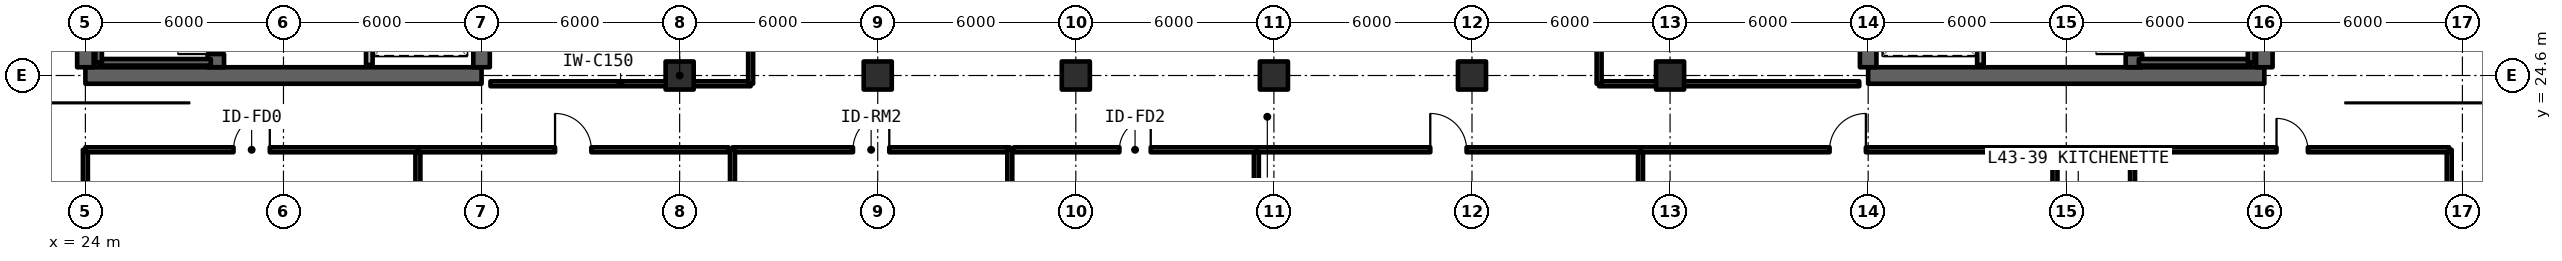
"""IFC4 building model, lengths in metres.
Left out: names, types, materials, properties, quantities, classifications, styles, units other than length and angle.
Written with IfcOpenShell. Run it as: python <this file> out.ifc"""

import sys

from ifc_helpers import new_model, si_unit, direction, frame, frame_2d, origin, origin_2d, place, context, subcontext, project, spatial, rectangle, extrude, element, fill, save


model = new_model("IFC4")
c1 = context("Model", 3, precision=1e-05, world=origin(), true_north=direction((0.0, 1.0)))
c2 = subcontext(c1, "Body", "Model", "MODEL_VIEW")
j1 = project(units=[si_unit("LENGTHUNIT", "METRE"), si_unit("PLANEANGLEUNIT", "RADIAN")], contexts=[c1])
p1 = place(None, origin())
s1 = spatial("IfcSite", under=j1, at=p1, CompositionType="ELEMENT")
p2 = place(p1, origin())
s2 = spatial("IfcBuilding", under=s1, at=p2, CompositionType="ELEMENT")
p3 = place(p2, frame((0.0, 0.0, 155.1)))
s3 = spatial("IfcBuildingStorey", under=s2, at=p3, CompositionType="ELEMENT", Elevation=155.1)
p4 = place(p3, frame((24.0, 24.6, 0.0), z_axis=(0.0, 0.0, 1.0), x_axis=(1.0, 0.0, 0.0)))
e1 = element("IfcWall", 1, at=p4, inside=s3, PredefinedType="SHEAR", context=c2, shape_type="SweptSolid", body=[
    extrude(rectangle(XDim=12.0, YDim=0.5, at=frame_2d((6.0, 0.0))), origin(), (0.0, 0.0, 1.0), 3.3),
])
p5 = place(p3, frame((24.0, 24.85, 0.0), z_axis=(0.0, 0.0, 1.0), x_axis=(0.0, 1.0, 0.0)))
e2 = element("IfcWall", 2, at=p5, inside=s3, PredefinedType="SHEAR", context=c2, shape_type="SweptSolid", body=[
    extrude(rectangle(XDim=17.5, YDim=0.5, at=frame_2d((8.75, 0.0))), origin(), (0.0, 0.0, 1.0), 3.3),
])
p6 = place(p3, frame((36.0, 24.85, 0.0), z_axis=(0.0, 0.0, 1.0), x_axis=(0.0, 1.0, 0.0)))
e3 = element("IfcWall", 3, at=p6, inside=s3, PredefinedType="SHEAR", context=c2, shape_type="SweptSolid", body=[
    extrude(rectangle(XDim=8.95, YDim=0.5, at=frame_2d((4.475, 0.0))), origin(), (0.0, 0.0, 1.0), 3.3),
])
p7 = place(p3, frame((27.95, 24.85, 0.0), z_axis=(0.0, 0.0, 1.0), x_axis=(0.0, 1.0, 0.0)))
e4 = element("IfcWall", 4, at=p7, inside=s3, PredefinedType="SHEAR", context=c2, shape_type="SweptSolid", body=[
    extrude(rectangle(XDim=17.5, YDim=0.5, at=frame_2d((8.75, 0.0))), origin(), (0.0, 0.0, 1.0), 3.3),
])
p8 = place(p7, frame((0.4, 0.0, 0.0)))
e5 = element("IfcOpeningElement", 5, at=p8, cuts=e4, PredefinedType="OPENING", context=c2, shape_type="SweptSolid", body=[
    extrude(rectangle(XDim=1.15, YDim=2.15, at=frame_2d((0.575, 1.075))), frame((0.0, 0.26, 0.0), z_axis=(0.0, -1.0, 0.0), x_axis=(1.0, 0.0, 0.0)), (0.0, 0.0, 1.0), 0.52),
])
p9 = place(p7, frame((9.6, 0.0, 0.0)))
e6 = element("IfcOpeningElement", 6, at=p9, cuts=e4, PredefinedType="OPENING", context=c2, shape_type="SweptSolid", body=[
    extrude(rectangle(XDim=1.15, YDim=2.15, at=frame_2d((0.575, 1.075))), frame((0.0, 0.26, 0.0), z_axis=(0.0, -1.0, 0.0), x_axis=(1.0, 0.0, 0.0)), (0.0, 0.0, 1.0), 0.52),
])
p10 = place(p3, frame((78.0, 24.6, 0.0), z_axis=(0.0, 0.0, 1.0), x_axis=(1.0, 0.0, 0.0)))
e7 = element("IfcWall", 7, at=p10, inside=s3, PredefinedType="SHEAR", context=c2, shape_type="SweptSolid", body=[
    extrude(rectangle(XDim=12.0, YDim=0.5, at=frame_2d((6.0, 0.0))), origin(), (0.0, 0.0, 1.0), 3.3),
])
p11 = place(p3, frame((90.0, 24.85, 0.0), z_axis=(0.0, 0.0, 1.0), x_axis=(0.0, 1.0, 0.0)))
e8 = element("IfcWall", 8, at=p11, inside=s3, PredefinedType="SHEAR", context=c2, shape_type="SweptSolid", body=[
    extrude(rectangle(XDim=17.5, YDim=0.5, at=frame_2d((8.75, 0.0))), origin(), (0.0, 0.0, 1.0), 3.3),
])
p12 = place(p3, frame((78.0, 24.85, 0.0), z_axis=(0.0, 0.0, 1.0), x_axis=(0.0, 1.0, 0.0)))
e9 = element("IfcWall", 9, at=p12, inside=s3, PredefinedType="SHEAR", context=c2, shape_type="SweptSolid", body=[
    extrude(rectangle(XDim=8.95, YDim=0.5, at=frame_2d((4.475, 0.0))), origin(), (0.0, 0.0, 1.0), 3.3),
])
p13 = place(p3, frame((86.05, 24.85, 0.0), z_axis=(0.0, 0.0, 1.0), x_axis=(0.0, 1.0, 0.0)))
e10 = element("IfcWall", 10, at=p13, inside=s3, PredefinedType="SHEAR", context=c2, shape_type="SweptSolid", body=[
    extrude(rectangle(XDim=17.5, YDim=0.5, at=frame_2d((8.75, 0.0))), origin(), (0.0, 0.0, 1.0), 3.3),
])
p14 = place(p13, frame((0.4, 0.0, 0.0)))
e11 = element("IfcOpeningElement", 11, at=p14, cuts=e10, PredefinedType="OPENING", context=c2, shape_type="SweptSolid", body=[
    extrude(rectangle(XDim=1.15, YDim=2.15, at=frame_2d((0.575, 1.075))), frame((0.0, 0.26, 0.0), z_axis=(0.0, -1.0, 0.0), x_axis=(1.0, 0.0, 0.0)), (0.0, 0.0, 1.0), 0.52),
])
p15 = place(p13, frame((9.6, 0.0, 0.0)))
e12 = element("IfcOpeningElement", 12, at=p15, cuts=e10, PredefinedType="OPENING", context=c2, shape_type="SweptSolid", body=[
    extrude(rectangle(XDim=1.15, YDim=2.15, at=frame_2d((0.575, 1.075))), frame((0.0, 0.26, 0.0), z_axis=(0.0, -1.0, 0.0), x_axis=(1.0, 0.0, 0.0)), (0.0, 0.0, 1.0), 0.52),
])
for number, where, z_axis, x_axis in (
    (13, (42.0, 24.6, 0.0), (0.0, 0.0, 1.0), (1.0, 0.0, 0.0)),
    (14, (48.0, 24.6, 0.0), (0.0, 0.0, 1.0), (1.0, 0.0, 0.0)),
    (15, (54.0, 24.6, 0.0), (0.0, 0.0, 1.0), (1.0, 0.0, 0.0)),
    (16, (60.0, 24.6, 0.0), (0.0, 0.0, 1.0), (1.0, 0.0, 0.0)),
    (17, (66.0, 24.6, 0.0), (0.0, 0.0, 1.0), (1.0, 0.0, 0.0)),
    (18, (72.0, 24.6, 0.0), (0.0, 0.0, 1.0), (1.0, 0.0, 0.0)),
):
    element("IfcColumn", number, at=place(p3, frame(where, z_axis=z_axis, x_axis=x_axis)), inside=s3, PredefinedType="COLUMN", context=c2, shape_type="SweptSolid", body=[
        extrude(rectangle(XDim=0.85, YDim=0.85, at=origin_2d()), origin(), (0.0, 0.0, 1.0), 3.3),
    ])
p16 = place(p3, frame((32.6, 24.92, 0.0), z_axis=(0.0, 0.0, 1.0), x_axis=(0.0, 1.0, 0.0)))
e19 = element("IfcWall", 19, at=p16, inside=s3, PredefinedType="SOLIDWALL", context=c2, shape_type="SweptSolid", body=[
    extrude(rectangle(XDim=3.58, YDim=0.2, at=frame_2d((1.79, 0.0))), origin(), (0.0, 0.0, 1.0), 2.35),
])
p17 = place(p16, frame((1.3, 0.0, 0.0)))
e20 = element("IfcOpeningElement", 20, at=p17, cuts=e19, PredefinedType="OPENING", context=c2, shape_type="SweptSolid", body=[
    extrude(rectangle(XDim=1.1, YDim=2.2, at=frame_2d((0.55, 1.1))), frame((0.0, 0.11, 0.0), z_axis=(0.0, -1.0, 0.0), x_axis=(1.0, 0.0, 0.0)), (0.0, 0.0, 1.0), 0.22),
])
p18 = place(p3, frame((81.4, 24.92, 0.0), z_axis=(0.0, 0.0, 1.0), x_axis=(0.0, 1.0, 0.0)))
e21 = element("IfcWall", 21, at=p18, inside=s3, PredefinedType="SOLIDWALL", context=c2, shape_type="SweptSolid", body=[
    extrude(rectangle(XDim=3.58, YDim=0.2, at=frame_2d((1.79, 0.0))), origin(), (0.0, 0.0, 1.0), 2.35),
])
p19 = place(p18, frame((1.3, 0.0, 0.0)))
e22 = element("IfcOpeningElement", 22, at=p19, cuts=e21, PredefinedType="OPENING", context=c2, shape_type="SweptSolid", body=[
    extrude(rectangle(XDim=1.1, YDim=2.2, at=frame_2d((0.55, 1.1))), frame((0.0, 0.11, 0.0), z_axis=(0.0, -1.0, 0.0), x_axis=(1.0, 0.0, 0.0)), (0.0, 0.0, 1.0), 0.22),
])
p20 = place(p3, frame((36.27, 24.35, 0.0), z_axis=(0.0, 0.0, 1.0), x_axis=(1.0, 0.0, 0.0)))
e23 = element("IfcWall", 23, at=p20, inside=s3, PredefinedType="SOLIDWALL", context=c2, shape_type="SweptSolid", body=[
    extrude(rectangle(XDim=7.88, YDim=0.15, at=frame_2d((3.94, 0.0))), origin(), (0.0, 0.0, 1.0), 2.35),
])
p21 = place(p3, frame((44.15, 24.35, 0.0), z_axis=(0.0, 0.0, 1.0), x_axis=(0.0, 1.0, 0.0)))
e24 = element("IfcWall", 24, at=p21, inside=s3, PredefinedType="SOLIDWALL", context=c2, shape_type="SweptSolid", body=[
    extrude(rectangle(XDim=9.4, YDim=0.15, at=frame_2d((4.7, 0.0))), origin(), (0.0, 0.0, 1.0), 2.35),
])
p22 = place(p3, frame((69.85, 24.35, 0.0), z_axis=(0.0, 0.0, 1.0), x_axis=(1.0, 0.0, 0.0)))
e25 = element("IfcWall", 25, at=p22, inside=s3, PredefinedType="SOLIDWALL", context=c2, shape_type="SweptSolid", body=[
    extrude(rectangle(XDim=7.88, YDim=0.15, at=frame_2d((3.94, 0.0))), origin(), (0.0, 0.0, 1.0), 2.35),
])
p23 = place(p3, frame((69.85, 24.35, 0.0), z_axis=(0.0, 0.0, 1.0), x_axis=(0.0, 1.0, 0.0)))
e26 = element("IfcWall", 26, at=p23, inside=s3, PredefinedType="SOLIDWALL", context=c2, shape_type="SweptSolid", body=[
    extrude(rectangle(XDim=9.4, YDim=0.15, at=frame_2d((4.7, 0.0))), origin(), (0.0, 0.0, 1.0), 2.35),
])
p24 = place(p3, frame((43.6, 22.35, 0.0), z_axis=(0.0, 0.0, 1.0), x_axis=(1.0, 0.0, 0.0)))
e27 = element("IfcWall", 27, at=p24, inside=s3, PredefinedType="SOLIDWALL", context=c2, shape_type="SweptSolid", body=[
    extrude(rectangle(XDim=8.4, YDim=0.15, at=frame_2d((4.2, 0.0))), origin(), (0.0, 0.0, 1.0), 2.35),
])
p25 = place(p24, frame((3.65, 0.0, 0.0)))
e28 = element("IfcOpeningElement", 28, at=p25, cuts=e27, PredefinedType="OPENING", context=c2, shape_type="SweptSolid", body=[
    extrude(rectangle(XDim=1.1, YDim=2.15, at=frame_2d((0.55, 1.075))), frame((0.0, 0.085, 0.0), z_axis=(0.0, -1.0, 0.0), x_axis=(1.0, 0.0, 0.0)), (0.0, 0.0, 1.0), 0.17),
])
for number, where, z_axis, x_axis in (
    (29, (43.6, 12.15, 0.0), (0.0, 0.0, 1.0), (0.0, 1.0, 0.0)),
    (30, (52.0, 12.15, 0.0), (0.0, 0.0, 1.0), (0.0, 1.0, 0.0)),
    (31, (24.0, 12.15, 0.0), (0.0, 0.0, 1.0), (0.0, 1.0, 0.0)),
    (32, (34.072, 12.15, 0.0), (0.0, 0.0, 1.0), (0.0, 1.0, 0.0)),
):
    element("IfcWall", number, at=place(p3, frame(where, z_axis=z_axis, x_axis=x_axis)), inside=s3, PredefinedType="SOLIDWALL", context=c2, shape_type="SweptSolid", body=[
        extrude(rectangle(XDim=10.2, YDim=0.15, at=frame_2d((5.1, 0.0))), origin(), (0.0, 0.0, 1.0), 2.35),
    ])
p26 = place(p3, frame((24.0, 22.35, 0.0), z_axis=(0.0, 0.0, 1.0), x_axis=(1.0, 0.0, 0.0)))
e33 = element("IfcWall", 33, at=p26, inside=s3, PredefinedType="SOLIDWALL", context=c2, shape_type="SweptSolid", body=[
    extrude(rectangle(XDim=10.072, YDim=0.15, at=frame_2d((5.036, 0.0))), origin(), (0.0, 0.0, 1.0), 2.35),
])
p27 = place(p26, frame((4.486, 0.0, 0.0)))
e34 = element("IfcOpeningElement", 34, at=p27, cuts=e33, PredefinedType="OPENING", context=c2, shape_type="SweptSolid", body=[
    extrude(rectangle(XDim=1.1, YDim=2.15, at=frame_2d((0.55, 1.075))), frame((0.0, 0.085, 0.0), z_axis=(0.0, -1.0, 0.0), x_axis=(1.0, 0.0, 0.0)), (0.0, 0.0, 1.0), 0.17),
])
p28 = place(p3, frame((34.072, 22.35, 0.0), z_axis=(0.0, 0.0, 1.0), x_axis=(1.0, 0.0, 0.0)))
e35 = element("IfcWall", 35, at=p28, inside=s3, PredefinedType="SOLIDWALL", context=c2, shape_type="SweptSolid", body=[
    extrude(rectangle(XDim=9.408, YDim=0.15, at=frame_2d((4.704, 0.0))), origin(), (0.0, 0.0, 1.0), 2.35),
])
p29 = place(p28, frame((4.154, 0.0, 0.0)))
e36 = element("IfcOpeningElement", 36, at=p29, cuts=e35, PredefinedType="OPENING", context=c2, shape_type="SweptSolid", body=[
    extrude(rectangle(XDim=1.1, YDim=2.15, at=frame_2d((0.55, 1.075))), frame((0.0, 0.085, 0.0), z_axis=(0.0, -1.0, 0.0), x_axis=(1.0, 0.0, 0.0)), (0.0, 0.0, 1.0), 0.17),
])
for number, where, z_axis, x_axis in (
    (37, (95.6, 12.15, 0.0), (0.0, 0.0, 1.0), (0.0, 1.0, 0.0)),
    (38, (59.469, 12.15, 0.0), (0.0, 0.0, 1.0), (0.0, 1.0, 0.0)),
):
    element("IfcWall", number, at=place(p3, frame(where, z_axis=z_axis, x_axis=x_axis)), inside=s3, PredefinedType="SOLIDWALL", context=c2, shape_type="SweptSolid", body=[
        extrude(rectangle(XDim=10.2, YDim=0.15, at=frame_2d((5.1, 0.0))), origin(), (0.0, 0.0, 1.0), 2.35),
    ])
p30 = place(p3, frame((52.12, 22.35, 0.0), z_axis=(0.0, 0.0, 1.0), x_axis=(1.0, 0.0, 0.0)))
e39 = element("IfcWall", 39, at=p30, inside=s3, PredefinedType="SOLIDWALL", context=c2, shape_type="SweptSolid", body=[
    extrude(rectangle(XDim=7.349, YDim=0.15, at=frame_2d((3.674, 0.0))), origin(), (0.0, 0.0, 1.0), 2.35),
])
p31 = place(p30, frame((3.199, 0.0, 0.0)))
e40 = element("IfcOpeningElement", 40, at=p31, cuts=e39, PredefinedType="OPENING", context=c2, shape_type="SweptSolid", body=[
    extrude(rectangle(XDim=0.95, YDim=2.15, at=frame_2d((0.475, 1.075))), frame((0.0, 0.085, 0.0), z_axis=(0.0, -1.0, 0.0), x_axis=(1.0, 0.0, 0.0)), (0.0, 0.0, 1.0), 0.17),
])
p32 = place(p3, frame((71.104, 12.15, 0.0), z_axis=(0.0, 0.0, 1.0), x_axis=(0.0, 1.0, 0.0)))
e41 = element("IfcWall", 41, at=p32, inside=s3, PredefinedType="SOLIDWALL", context=c2, shape_type="SweptSolid", body=[
    extrude(rectangle(XDim=10.2, YDim=0.15, at=frame_2d((5.1, 0.0))), origin(), (0.0, 0.0, 1.0), 2.35),
])
p33 = place(p3, frame((59.469, 22.35, 0.0), z_axis=(0.0, 0.0, 1.0), x_axis=(1.0, 0.0, 0.0)))
e42 = element("IfcWall", 42, at=p33, inside=s3, PredefinedType="SOLIDWALL", context=c2, shape_type="SweptSolid", body=[
    extrude(rectangle(XDim=11.635, YDim=0.15, at=frame_2d((5.818, 0.0))), origin(), (0.0, 0.0, 1.0), 2.35),
])
p34 = place(p33, frame((5.268, 0.0, 0.0)))
e43 = element("IfcOpeningElement", 43, at=p34, cuts=e42, PredefinedType="OPENING", context=c2, shape_type="SweptSolid", body=[
    extrude(rectangle(XDim=1.1, YDim=2.15, at=frame_2d((0.55, 1.075))), frame((0.0, 0.085, 0.0), z_axis=(0.0, -1.0, 0.0), x_axis=(1.0, 0.0, 0.0)), (0.0, 0.0, 1.0), 0.17),
])
p35 = place(p3, frame((83.658, 12.15, 0.0), z_axis=(0.0, 0.0, 1.0), x_axis=(0.0, 1.0, 0.0)))
e44 = element("IfcWall", 44, at=p35, inside=s3, PredefinedType="SOLIDWALL", context=c2, shape_type="SweptSolid", body=[
    extrude(rectangle(XDim=10.2, YDim=0.15, at=frame_2d((5.1, 0.0))), origin(), (0.0, 0.0, 1.0), 2.35),
])
p36 = place(p3, frame((71.104, 22.35, 0.0), z_axis=(0.0, 0.0, 1.0), x_axis=(1.0, 0.0, 0.0)))
e45 = element("IfcWall", 45, at=p36, inside=s3, PredefinedType="SOLIDWALL", context=c2, shape_type="SweptSolid", body=[
    extrude(rectangle(XDim=12.554, YDim=0.15, at=frame_2d((6.277, 0.0))), origin(), (0.0, 0.0, 1.0), 2.35),
])
p37 = place(p36, frame((5.727, 0.0, 0.0)))
e46 = element("IfcOpeningElement", 46, at=p37, cuts=e45, PredefinedType="OPENING", context=c2, shape_type="SweptSolid", body=[
    extrude(rectangle(XDim=1.1, YDim=2.15, at=frame_2d((0.55, 1.075))), frame((0.0, 0.085, 0.0), z_axis=(0.0, -1.0, 0.0), x_axis=(1.0, 0.0, 0.0)), (0.0, 0.0, 1.0), 0.17),
])
p38 = place(p3, frame((86.008, 16.901, 0.0), z_axis=(0.0, 0.0, 1.0), x_axis=(0.0, 1.0, 0.0)))
e47 = element("IfcWall", 47, at=p38, inside=s3, PredefinedType="PARTITIONING", context=c2, shape_type="SweptSolid", body=[
    extrude(rectangle(XDim=5.449, YDim=0.15, at=frame_2d((2.725, 0.0))), origin(), (0.0, 0.0, 1.0), 2.35),
])
p39 = place(p38, frame((0.692, 0.0, 0.0)))
e48 = element("IfcOpeningElement", 48, at=p39, cuts=e47, PredefinedType="OPENING", context=c2, shape_type="SweptSolid", body=[
    extrude(rectangle(XDim=0.85, YDim=2.1, at=frame_2d((0.425, 1.05))), frame((0.0, 0.085, 0.0), z_axis=(0.0, -1.0, 0.0), x_axis=(1.0, 0.0, 0.0)), (0.0, 0.0, 1.0), 0.17),
])
p40 = place(p38, frame((3.417, 0.0, 0.0)))
e49 = element("IfcOpeningElement", 49, at=p40, cuts=e47, PredefinedType="OPENING", context=c2, shape_type="SweptSolid", body=[
    extrude(rectangle(XDim=0.85, YDim=2.1, at=frame_2d((0.425, 1.05))), frame((0.0, 0.085, 0.0), z_axis=(0.0, -1.0, 0.0), x_axis=(1.0, 0.0, 0.0)), (0.0, 0.0, 1.0), 0.17),
])
p41 = place(p3, frame((83.658, 22.35, 0.0), z_axis=(0.0, 0.0, 1.0), x_axis=(1.0, 0.0, 0.0)))
e50 = element("IfcWall", 50, at=p41, inside=s3, PredefinedType="SOLIDWALL", context=c2, shape_type="SweptSolid", body=[
    extrude(rectangle(XDim=11.942, YDim=0.15, at=frame_2d((5.971, 0.0))), origin(), (0.0, 0.0, 1.0), 2.35),
])
p42 = place(p41, frame((6.711, 0.0, 0.0)))
e51 = element("IfcOpeningElement", 51, at=p42, cuts=e50, PredefinedType="OPENING", context=c2, shape_type="SweptSolid", body=[
    extrude(rectangle(XDim=0.95, YDim=2.15, at=frame_2d((0.475, 1.075))), frame((0.0, 0.085, 0.0), z_axis=(0.0, -1.0, 0.0), x_axis=(1.0, 0.0, 0.0)), (0.0, 0.0, 1.0), 0.17),
])
p43 = place(p3, frame((24.4, 25.0, 0.0), z_axis=(0.0, 0.0, 1.0), x_axis=(1.0, 0.0, 0.0)))
e52 = element("IfcWall", 52, at=p43, inside=s3, PredefinedType="SOLIDWALL", context=c2, shape_type="SweptSolid", body=[
    extrude(rectangle(XDim=3.4, YDim=0.2, at=frame_2d((1.7, 0.0))), origin(), (0.0, 0.0, 1.0), 3.3),
])
p44 = place(p3, frame((24.4, 33.0, 0.0), z_axis=(0.0, 0.0, 1.0), x_axis=(0.0, -1.0, 0.0)))
e53 = element("IfcWall", 53, at=p44, inside=s3, PredefinedType="SOLIDWALL", context=c2, shape_type="SweptSolid", body=[
    extrude(rectangle(XDim=8.0, YDim=0.2, at=frame_2d((4.0, 0.0))), origin(), (0.0, 0.0, 1.0), 3.3),
])
p45 = place(p3, frame((86.2, 25.0, 0.0), z_axis=(0.0, 0.0, 1.0), x_axis=(1.0, 0.0, 0.0)))
e54 = element("IfcWall", 54, at=p45, inside=s3, PredefinedType="SOLIDWALL", context=c2, shape_type="SweptSolid", body=[
    extrude(rectangle(XDim=3.4, YDim=0.2, at=frame_2d((1.7, 0.0))), origin(), (0.0, 0.0, 1.0), 3.3),
])
p46 = place(p3, frame((89.6, 25.0, 0.0), z_axis=(0.0, 0.0, 1.0), x_axis=(0.0, 1.0, 0.0)))
e55 = element("IfcWall", 55, at=p46, inside=s3, PredefinedType="SOLIDWALL", context=c2, shape_type="SweptSolid", body=[
    extrude(rectangle(XDim=8.0, YDim=0.2, at=frame_2d((4.0, 0.0))), origin(), (0.0, 0.0, 1.0), 3.3),
])
p47 = place(p25, origin())
e56 = element("IfcDoor", 56, at=p47, inside=s3, OperationType="SINGLE_SWING_RIGHT", PredefinedType="DOOR", context=c2, shape_type="SweptSolid", body=[
    extrude(rectangle(XDim=1.1, YDim=2.15, at=frame_2d((0.55, 1.075))), frame((0.0, 0.025, 0.0), z_axis=(0.0, -1.0, 0.0), x_axis=(1.0, 0.0, 0.0)), (0.0, 0.0, 1.0), 0.05),
])
fill(e28, e56)
p48 = place(p27, origin())
e57 = element("IfcDoor", 57, at=p48, inside=s3, OperationType="SINGLE_SWING_RIGHT", PredefinedType="DOOR", context=c2, shape_type="SweptSolid", body=[
    extrude(rectangle(XDim=1.1, YDim=2.15, at=frame_2d((0.55, 1.075))), frame((0.0, 0.025, 0.0), z_axis=(0.0, -1.0, 0.0), x_axis=(1.0, 0.0, 0.0)), (0.0, 0.0, 1.0), 0.05),
])
fill(e34, e57)
p49 = place(p29, origin())
e58 = element("IfcDoor", 58, at=p49, inside=s3, OperationType="SINGLE_SWING_LEFT", PredefinedType="DOOR", context=c2, shape_type="SweptSolid", body=[
    extrude(rectangle(XDim=1.1, YDim=2.15, at=frame_2d((0.55, 1.075))), frame((0.0, 0.025, 0.0), z_axis=(0.0, -1.0, 0.0), x_axis=(1.0, 0.0, 0.0)), (0.0, 0.0, 1.0), 0.05),
])
fill(e36, e58)
p50 = place(p31, origin())
e59 = element("IfcDoor", 59, at=p50, inside=s3, OperationType="SINGLE_SWING_RIGHT", PredefinedType="DOOR", context=c2, shape_type="SweptSolid", body=[
    extrude(rectangle(XDim=0.95, YDim=2.15, at=frame_2d((0.475, 1.075))), frame((0.0, 0.025, 0.0), z_axis=(0.0, -1.0, 0.0), x_axis=(1.0, 0.0, 0.0)), (0.0, 0.0, 1.0), 0.05),
])
fill(e40, e59)
p51 = place(p34, origin())
e60 = element("IfcDoor", 60, at=p51, inside=s3, OperationType="SINGLE_SWING_LEFT", PredefinedType="DOOR", context=c2, shape_type="SweptSolid", body=[
    extrude(rectangle(XDim=1.1, YDim=2.15, at=frame_2d((0.55, 1.075))), frame((0.0, 0.025, 0.0), z_axis=(0.0, -1.0, 0.0), x_axis=(1.0, 0.0, 0.0)), (0.0, 0.0, 1.0), 0.05),
])
fill(e43, e60)
p52 = place(p37, origin())
e61 = element("IfcDoor", 61, at=p52, inside=s3, OperationType="SINGLE_SWING_RIGHT", PredefinedType="DOOR", context=c2, shape_type="SweptSolid", body=[
    extrude(rectangle(XDim=1.1, YDim=2.15, at=frame_2d((0.55, 1.075))), frame((0.0, 0.025, 0.0), z_axis=(0.0, -1.0, 0.0), x_axis=(1.0, 0.0, 0.0)), (0.0, 0.0, 1.0), 0.05),
])
fill(e46, e61)
p53 = place(p42, origin())
e62 = element("IfcDoor", 62, at=p53, inside=s3, OperationType="SINGLE_SWING_LEFT", PredefinedType="DOOR", context=c2, shape_type="SweptSolid", body=[
    extrude(rectangle(XDim=0.95, YDim=2.15, at=frame_2d((0.475, 1.075))), frame((0.0, 0.025, 0.0), z_axis=(0.0, -1.0, 0.0), x_axis=(1.0, 0.0, 0.0)), (0.0, 0.0, 1.0), 0.05),
])
fill(e51, e62)
p54 = place(p8, origin())
e63 = element("IfcDoor", 63, at=p54, inside=s3, OperationType="SINGLE_SWING_RIGHT", PredefinedType="DOOR", context=c2, shape_type="SweptSolid", body=[
    extrude(rectangle(XDim=1.15, YDim=2.15, at=frame_2d((0.575, 1.075))), frame((0.0, 0.025, 0.0), z_axis=(0.0, -1.0, 0.0), x_axis=(1.0, 0.0, 0.0)), (0.0, 0.0, 1.0), 0.05),
])
fill(e5, e63)
p55 = place(p14, origin())
e64 = element("IfcDoor", 64, at=p55, inside=s3, OperationType="SINGLE_SWING_RIGHT", PredefinedType="DOOR", context=c2, shape_type="SweptSolid", body=[
    extrude(rectangle(XDim=1.15, YDim=2.15, at=frame_2d((0.575, 1.075))), frame((0.0, 0.025, 0.0), z_axis=(0.0, -1.0, 0.0), x_axis=(1.0, 0.0, 0.0)), (0.0, 0.0, 1.0), 0.05),
])
fill(e11, e64)
save(model, sys.argv[1])
